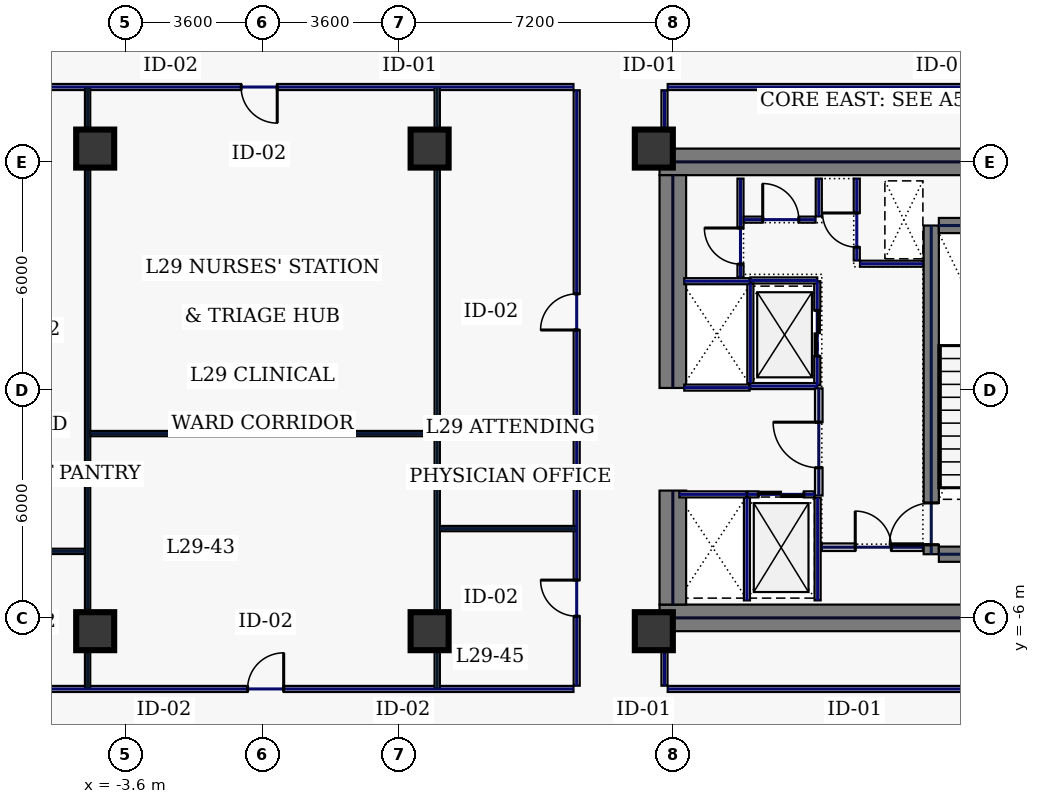
"""IFC4 building model, lengths in metres.
Left out: names, types, materials, properties, quantities, classifications, styles, units other than length and angle.
Written with IfcOpenShell. Run it as: python <this file> out.ifc"""

import sys

from ifc_helpers import new_model, si_unit, direction, frame, frame_2d, origin, origin_2d, place, context, subcontext, project, spatial, rectangle, hollow_rectangle, extrude, element, fill, save


model = new_model("IFC4")
c1 = context("Model", 3, precision=1e-05, world=origin(), true_north=direction((0.0, 1.0)))
c2 = subcontext(c1, "Body", "Model", "MODEL_VIEW")
j1 = project(units=[si_unit("LENGTHUNIT", "METRE"), si_unit("PLANEANGLEUNIT", "RADIAN")], contexts=[c1])
p1 = place(None, origin())
s1 = spatial("IfcSite", under=j1, at=p1, CompositionType="ELEMENT")
p2 = place(p1, origin())
s2 = spatial("IfcBuilding", under=s1, at=p2, CompositionType="ELEMENT")
p3 = place(p2, frame((0.0, 0.0, 129.4)))
s3 = spatial("IfcBuildingStorey", under=s2, at=p3, CompositionType="ELEMENT", Elevation=129.4)
for number, where, z_axis, x_axis in (
    (1, (10.45, 6.0, 0.0), (0.0, 0.0, 1.0), (1.0, 0.0, 0.0)),
    (2, (10.45, -6.0, 0.0), (0.0, 0.0, 1.0), (1.0, 0.0, 0.0)),
):
    element("IfcWall", number, at=place(p3, frame(where, z_axis=z_axis, x_axis=x_axis)), inside=s3, PredefinedType="SHEAR", context=c2, shape_type="SweptSolid", body=[
        extrude(rectangle(XDim=11.55, YDim=0.7, at=frame_2d((5.775, 0.0))), origin(), (0.0, 0.0, 1.0), 3.74),
    ])
p4 = place(p3, frame((10.8, -5.65, 0.0), z_axis=(0.0, 0.0, 1.0), x_axis=(0.0, 1.0, 0.0)))
e3 = element("IfcWall", 3, at=p4, inside=s3, PredefinedType="SHEAR", context=c2, shape_type="SweptSolid", body=[
    extrude(rectangle(XDim=3.0, YDim=0.7, at=frame_2d((1.5, 0.0))), origin(), (0.0, 0.0, 1.0), 3.74),
])
p5 = place(p3, frame((10.8, 0.05, 0.0), z_axis=(0.0, 0.0, 1.0), x_axis=(0.0, 1.0, 0.0)))
e4 = element("IfcWall", 4, at=p5, inside=s3, PredefinedType="SHEAR", context=c2, shape_type="SweptSolid", body=[
    extrude(rectangle(XDim=5.6, YDim=0.7, at=frame_2d((2.8, 0.0))), origin(), (0.0, 0.0, 1.0), 3.74),
])
p6 = place(p3, frame((17.6, -4.325, 0.0), z_axis=(0.0, 0.0, 1.0), x_axis=(0.0, 1.0, 0.0)))
e5 = element("IfcWall", 5, at=p6, inside=s3, PredefinedType="SHEAR", context=c2, shape_type="SweptSolid", body=[
    extrude(rectangle(XDim=8.65, YDim=0.4, at=frame_2d((4.325, 0.0))), origin(), (0.0, 0.0, 1.0), 3.74),
])
p7 = place(p6, frame((0.25, 0.0, 0.0)))
e6 = element("IfcOpeningElement", 6, at=p7, cuts=e5, PredefinedType="OPENING", context=c2, shape_type="SweptSolid", body=[
    extrude(rectangle(XDim=1.1, YDim=2.2, at=frame_2d((0.55, 1.1))), frame((0.0, 0.21, 0.0), z_axis=(0.0, -1.0, 0.0), x_axis=(1.0, 0.0, 0.0)), (0.0, 0.0, 1.0), 0.42),
])
for number, where, z_axis, x_axis in (
    (7, (17.8, -4.325, 0.0), (0.0, 0.0, 1.0), (1.0, 0.0, 0.0)),
    (8, (17.8, 4.325, 0.0), (0.0, 0.0, 1.0), (1.0, 0.0, 0.0)),
):
    element("IfcWall", number, at=place(p3, frame(where, z_axis=z_axis, x_axis=x_axis)), inside=s3, PredefinedType="SHEAR", context=c2, shape_type="SweptSolid", body=[
        extrude(rectangle(XDim=3.4, YDim=0.4, at=frame_2d((1.7, 0.0))), origin(), (0.0, 0.0, 1.0), 3.74),
    ])
for number, where, z_axis, x_axis in (
    (9, (10.3, -6.35, 0.0), (0.0, 0.0, 1.0), (1.0, 0.0, 0.0)),
    (10, (10.3, 6.35, 0.0), (0.0, 0.0, 1.0), (1.0, 0.0, 0.0)),
    (11, (-4.4, -6.35, 0.0), (0.0, 0.0, 1.0), (1.0, 0.0, 0.0)),
    (12, (4.4, -6.35, 0.0), (0.0, 0.0, 1.0), (1.0, 0.0, 0.0)),
    (13, (-4.4, 6.35, 0.0), (0.0, 0.0, 1.0), (1.0, 0.0, 0.0)),
    (14, (4.4, 6.35, 0.0), (0.0, 0.0, 1.0), (1.0, 0.0, 0.0)),
):
    element("IfcColumn", number, at=place(p3, frame(where, z_axis=z_axis, x_axis=x_axis)), inside=s3, PredefinedType="COLUMN", context=c2, shape_type="SweptSolid", body=[
        extrude(hollow_rectangle(XDim=1.0, YDim=1.0, WallThickness=0.045, at=origin_2d()), origin(), (0.0, 0.0, 1.0), 3.74),
    ])
p8 = place(p3, frame((14.6, 0.12, 0.0), z_axis=(0.0, 0.0, 1.0), x_axis=(0.0, 1.0, 0.0)))
e15 = element("IfcWall", 15, at=p8, inside=s3, PredefinedType="PARTITIONING", context=c2, shape_type="SweptSolid", body=[
    extrude(rectangle(XDim=2.74, YDim=0.16, at=frame_2d((1.37, 0.0))), origin(), (0.0, 0.0, 1.0), 3.74),
])
p9 = place(p8, frame((0.77, 0.0, 0.0)))
e16 = element("IfcOpeningElement", 16, at=p9, cuts=e15, PredefinedType="OPENING", context=c2, shape_type="SweptSolid", body=[
    extrude(rectangle(XDim=1.2, YDim=2.2, at=frame_2d((0.6, 1.1))), frame((0.0, 0.09, 0.0), z_axis=(0.0, -1.0, 0.0), x_axis=(1.0, 0.0, 0.0)), (0.0, 0.0, 1.0), 0.18),
])
for number, where, z_axis, x_axis in (
    (17, (12.84, 0.1, 0.0), (0.0, 0.0, 1.0), (1.0, 0.0, 0.0)),
    (18, (12.84, 2.88, 0.0), (0.0, 0.0, 1.0), (1.0, 0.0, 0.0)),
):
    element("IfcWall", number, at=place(p3, frame(where, z_axis=z_axis, x_axis=x_axis)), inside=s3, PredefinedType="PARTITIONING", context=c2, shape_type="SweptSolid", body=[
        extrude(rectangle(XDim=1.76, YDim=0.16, at=frame_2d((0.88, 0.0))), origin(), (0.0, 0.0, 1.0), 3.74),
    ])
p10 = place(p3, frame((12.84, 0.18, 0.0), z_axis=(0.0, 0.0, 1.0), x_axis=(0.0, 1.0, 0.0)))
e19 = element("IfcWall", 19, at=p10, inside=s3, PredefinedType="PARTITIONING", context=c2, shape_type="SweptSolid", body=[
    extrude(rectangle(XDim=2.62, YDim=0.16, at=frame_2d((1.31, 0.0))), origin(), (0.0, 0.0, 1.0), 3.74),
])
p11 = place(p3, frame((12.77, -2.75, 0.0), z_axis=(0.0, 0.0, 1.0), x_axis=(1.0, 0.0, 0.0)))
e20 = element("IfcWall", 20, at=p11, inside=s3, PredefinedType="PARTITIONING", context=c2, shape_type="SweptSolid", body=[
    extrude(rectangle(XDim=1.76, YDim=0.16, at=frame_2d((0.88, 0.0))), origin(), (0.0, 0.0, 1.0), 3.74),
])
p12 = place(p11, frame((0.28, 0.0, 0.0)))
e21 = element("IfcOpeningElement", 21, at=p12, cuts=e20, PredefinedType="OPENING", context=c2, shape_type="SweptSolid", body=[
    extrude(rectangle(XDim=1.2, YDim=2.2, at=frame_2d((0.6, 1.1))), frame((0.0, 0.09, 0.0), z_axis=(0.0, -1.0, 0.0), x_axis=(1.0, 0.0, 0.0)), (0.0, 0.0, 1.0), 0.18),
])
for number, where, z_axis, x_axis in (
    (22, (12.75, -5.54, 0.0), (0.0, 0.0, 1.0), (0.0, 1.0, 0.0)),
    (23, (14.61, -5.54, 0.0), (0.0, 0.0, 1.0), (0.0, 1.0, 0.0)),
):
    element("IfcWall", number, at=place(p3, frame(where, z_axis=z_axis, x_axis=x_axis)), inside=s3, PredefinedType="PARTITIONING", context=c2, shape_type="SweptSolid", body=[
        extrude(rectangle(XDim=2.7, YDim=0.16, at=frame_2d((1.35, 0.0))), origin(), (0.0, 0.0, 1.0), 3.74),
    ])
p13 = place(p3, frame((10.97, -2.75, 0.0), z_axis=(0.0, 0.0, 1.0), x_axis=(1.0, 0.0, 0.0)))
e24 = element("IfcWall", 24, at=p13, inside=s3, PredefinedType="PARTITIONING", context=c2, shape_type="SweptSolid", body=[
    extrude(rectangle(XDim=1.76, YDim=0.16, at=frame_2d((0.88, 0.0))), origin(), (0.0, 0.0, 1.0), 3.74),
])
for number, where, z_axis, x_axis in (
    (25, (11.1, 0.06, 0.0), (0.0, 0.0, 1.0), (1.0, 0.0, 0.0)),
    (26, (11.1, 2.86, 0.0), (0.0, 0.0, 1.0), (1.0, 0.0, 0.0)),
):
    element("IfcWall", number, at=place(p3, frame(where, z_axis=z_axis, x_axis=x_axis)), inside=s3, PredefinedType="PARTITIONING", context=c2, shape_type="SweptSolid", body=[
        extrude(rectangle(XDim=1.72, YDim=0.16, at=frame_2d((0.86, 0.0))), origin(), (0.0, 0.0, 1.0), 3.74),
    ])
p14 = place(p3, frame((15.64, 3.405, 0.0), z_axis=(0.0, 0.0, 1.0), x_axis=(0.0, 1.0, 0.0)))
e27 = element("IfcWall", 27, at=p14, inside=s3, PredefinedType="PARTITIONING", context=c2, shape_type="SweptSolid", body=[
    extrude(rectangle(XDim=2.155, YDim=0.16, at=frame_2d((1.078, 0.0))), origin(), (0.0, 0.0, 1.0), 3.74),
])
p15 = place(p14, frame((0.35, 0.0, 0.0)))
e28 = element("IfcOpeningElement", 28, at=p15, cuts=e27, PredefinedType="OPENING", context=c2, shape_type="SweptSolid", body=[
    extrude(rectangle(XDim=0.9, YDim=2.2, at=frame_2d((0.45, 1.1))), frame((0.0, 0.09, 0.0), z_axis=(0.0, -1.0, 0.0), x_axis=(1.0, 0.0, 0.0)), (0.0, 0.0, 1.0), 0.18),
])
p16 = place(p3, frame((15.725, 3.32, 0.0), z_axis=(0.0, 0.0, 1.0), x_axis=(1.0, 0.0, 0.0)))
e29 = element("IfcWall", 29, at=p16, inside=s3, PredefinedType="PARTITIONING", context=c2, shape_type="SweptSolid", body=[
    extrude(rectangle(XDim=1.655, YDim=0.16, at=frame_2d((0.827, 0.0))), origin(), (0.0, 0.0, 1.0), 3.74),
])
p17 = place(p3, frame((14.72, -4.14, 0.0), z_axis=(0.0, 0.0, 1.0), x_axis=(1.0, 0.0, 0.0)))
e30 = element("IfcWall", 30, at=p17, inside=s3, PredefinedType="SOLIDWALL", context=c2, shape_type="SweptSolid", body=[
    extrude(rectangle(XDim=2.66, YDim=0.2, at=frame_2d((1.33, 0.0))), origin(), (0.0, 0.0, 1.0), 3.74),
])
p18 = place(p17, frame((0.88, 0.0, 0.0)))
e31 = element("IfcOpeningElement", 31, at=p18, cuts=e30, PredefinedType="OPENING", context=c2, shape_type="SweptSolid", body=[
    extrude(rectangle(XDim=0.95, YDim=2.2, at=frame_2d((0.475, 1.1))), frame((0.0, 0.11, 0.0), z_axis=(0.0, -1.0, 0.0), x_axis=(1.0, 0.0, 0.0)), (0.0, 0.0, 1.0), 0.22),
])
p19 = place(p3, frame((12.58, 2.96, 0.0), z_axis=(0.0, 0.0, 1.0), x_axis=(0.0, 1.0, 0.0)))
e32 = element("IfcWall", 32, at=p19, inside=s3, PredefinedType="PARTITIONING", context=c2, shape_type="SweptSolid", body=[
    extrude(rectangle(XDim=2.6, YDim=0.16, at=frame_2d((1.3, 0.0))), origin(), (0.0, 0.0, 1.0), 3.74),
])
p20 = place(p19, frame((0.35, 0.0, 0.0)))
e33 = element("IfcOpeningElement", 33, at=p20, cuts=e32, PredefinedType="OPENING", context=c2, shape_type="SweptSolid", body=[
    extrude(rectangle(XDim=0.95, YDim=2.2, at=frame_2d((0.475, 1.1))), frame((0.0, 0.09, 0.0), z_axis=(0.0, -1.0, 0.0), x_axis=(1.0, 0.0, 0.0)), (0.0, 0.0, 1.0), 0.18),
])
p21 = place(p3, frame((12.665, 4.48, 0.0), z_axis=(0.0, 0.0, 1.0), x_axis=(1.0, 0.0, 0.0)))
e34 = element("IfcWall", 34, at=p21, inside=s3, PredefinedType="PARTITIONING", context=c2, shape_type="SweptSolid", body=[
    extrude(rectangle(XDim=1.89, YDim=0.16, at=frame_2d((0.945, 0.0))), origin(), (0.0, 0.0, 1.0), 3.74),
])
p22 = place(p21, frame((0.5, 0.0, 0.0)))
e35 = element("IfcOpeningElement", 35, at=p22, cuts=e34, PredefinedType="OPENING", context=c2, shape_type="SweptSolid", body=[
    extrude(rectangle(XDim=0.95, YDim=2.2, at=frame_2d((0.475, 1.1))), frame((0.0, 0.09, 0.0), z_axis=(0.0, -1.0, 0.0), x_axis=(1.0, 0.0, 0.0)), (0.0, 0.0, 1.0), 0.18),
])
p23 = place(p3, frame((14.64, 4.565, 0.0), z_axis=(0.0, 0.0, 1.0), x_axis=(0.0, 1.0, 0.0)))
e36 = element("IfcWall", 36, at=p23, inside=s3, PredefinedType="PARTITIONING", context=c2, shape_type="SweptSolid", body=[
    extrude(rectangle(XDim=0.995, YDim=0.16, at=frame_2d((0.498, 0.0))), origin(), (0.0, 0.0, 1.0), 3.74),
])
p24 = place(p3, frame((14.64, -2.78, 0.0), z_axis=(0.0, 0.0, 1.0), x_axis=(0.0, 1.0, 0.0)))
e37 = element("IfcWall", 37, at=p24, inside=s3, PredefinedType="SOLIDWALL", context=c2, shape_type="SweptSolid", body=[
    extrude(rectangle(XDim=2.82, YDim=0.2, at=frame_2d((1.41, 0.0))), origin(), (0.0, 0.0, 1.0), 3.74),
])
p25 = place(p24, frame((0.73, 0.0, 0.0)))
e38 = element("IfcOpeningElement", 38, at=p25, cuts=e37, PredefinedType="OPENING", context=c2, shape_type="SweptSolid", body=[
    extrude(rectangle(XDim=1.2, YDim=2.2, at=frame_2d((0.6, 1.1))), frame((0.0, 0.11, 0.0), z_axis=(0.0, -1.0, 0.0), x_axis=(1.0, 0.0, 0.0)), (0.0, 0.0, 1.0), 0.22),
])
p26 = place(p3, frame((25.235, 7.97, 0.0), z_axis=(0.0, 0.0, 1.0), x_axis=(-1.0, 0.0, 0.0)))
e39 = element("IfcWall", 39, at=p26, inside=s3, PredefinedType="PARTITIONING", context=c2, shape_type="SweptSolid", body=[
    extrude(rectangle(XDim=14.57, YDim=0.16, at=frame_2d((7.285, 0.0))), origin(), (0.0, 0.0, 1.0), 3.74),
])
p27 = place(p3, frame((10.58, 7.885, 0.0), z_axis=(0.0, 0.0, 1.0), x_axis=(0.0, -1.0, 0.0)))
e40 = element("IfcWall", 40, at=p27, inside=s3, PredefinedType="PARTITIONING", context=c2, shape_type="SweptSolid", body=[
    extrude(rectangle(XDim=1.465, YDim=0.16, at=frame_2d((0.732, 0.0))), origin(), (0.0, 0.0, 1.0), 3.74),
])
p28 = place(p3, frame((10.58, -6.42, 0.0), z_axis=(0.0, 0.0, 1.0), x_axis=(0.0, -1.0, 0.0)))
e41 = element("IfcWall", 41, at=p28, inside=s3, PredefinedType="PARTITIONING", context=c2, shape_type="SweptSolid", body=[
    extrude(rectangle(XDim=1.365, YDim=0.16, at=frame_2d((0.683, 0.0))), origin(), (0.0, 0.0, 1.0), 3.74),
])
p29 = place(p3, frame((10.665, -7.87, 0.0), z_axis=(0.0, 0.0, 1.0), x_axis=(1.0, 0.0, 0.0)))
e42 = element("IfcWall", 42, at=p29, inside=s3, PredefinedType="PARTITIONING", context=c2, shape_type="SweptSolid", body=[
    extrude(rectangle(XDim=14.57, YDim=0.16, at=frame_2d((7.285, 0.0))), origin(), (0.0, 0.0, 1.0), 3.74),
])
p30 = place(p3, frame((8.27, -7.785, 0.0), z_axis=(0.0, 0.0, 1.0), x_axis=(0.0, 1.0, 0.0)))
e43 = element("IfcWall", 43, at=p30, inside=s3, PredefinedType="PARTITIONING", context=c2, shape_type="SweptSolid", body=[
    extrude(rectangle(XDim=15.67, YDim=0.16, at=frame_2d((7.835, 0.0))), origin(), (0.0, 0.0, 1.0), 3.74),
])
p31 = place(p30, frame((1.829, 0.0, 0.0)))
e44 = element("IfcOpeningElement", 44, at=p31, cuts=e43, PredefinedType="OPENING", context=c2, shape_type="SweptSolid", body=[
    extrude(rectangle(XDim=0.95, YDim=2.2, at=frame_2d((0.475, 1.1))), frame((0.0, 0.09, 0.0), z_axis=(0.0, -1.0, 0.0), x_axis=(1.0, 0.0, 0.0)), (0.0, 0.0, 1.0), 0.18),
])
p32 = place(p30, frame((9.361, 0.0, 0.0)))
e45 = element("IfcOpeningElement", 45, at=p32, cuts=e43, PredefinedType="OPENING", context=c2, shape_type="SweptSolid", body=[
    extrude(rectangle(XDim=0.95, YDim=2.2, at=frame_2d((0.475, 1.1))), frame((0.0, 0.09, 0.0), z_axis=(0.0, -1.0, 0.0), x_axis=(1.0, 0.0, 0.0)), (0.0, 0.0, 1.0), 0.18),
])
p33 = place(p3, frame((8.185, 7.97, 0.0), z_axis=(0.0, 0.0, 1.0), x_axis=(-1.0, 0.0, 0.0)))
e46 = element("IfcWall", 46, at=p33, inside=s3, PredefinedType="PARTITIONING", context=c2, shape_type="SweptSolid", body=[
    extrude(rectangle(XDim=16.37, YDim=0.16, at=frame_2d((8.185, 0.0))), origin(), (0.0, 0.0, 1.0), 3.74),
])
p34 = place(p33, frame((7.795, 0.0, 0.0)))
e47 = element("IfcOpeningElement", 47, at=p34, cuts=e46, PredefinedType="OPENING", context=c2, shape_type="SweptSolid", body=[
    extrude(rectangle(XDim=0.95, YDim=2.2, at=frame_2d((0.475, 1.1))), frame((0.0, 0.09, 0.0), z_axis=(0.0, -1.0, 0.0), x_axis=(1.0, 0.0, 0.0)), (0.0, 0.0, 1.0), 0.18),
])
p35 = place(p3, frame((-8.185, -7.87, 0.0), z_axis=(0.0, 0.0, 1.0), x_axis=(1.0, 0.0, 0.0)))
e48 = element("IfcWall", 48, at=p35, inside=s3, PredefinedType="PARTITIONING", context=c2, shape_type="SweptSolid", body=[
    extrude(rectangle(XDim=16.37, YDim=0.16, at=frame_2d((8.185, 0.0))), origin(), (0.0, 0.0, 1.0), 3.74),
])
p36 = place(p35, frame((1.554, 0.0, 0.0)))
e49 = element("IfcOpeningElement", 49, at=p36, cuts=e48, PredefinedType="OPENING", context=c2, shape_type="SweptSolid", body=[
    extrude(rectangle(XDim=0.95, YDim=2.2, at=frame_2d((0.475, 1.1))), frame((0.0, 0.09, 0.0), z_axis=(0.0, -1.0, 0.0), x_axis=(1.0, 0.0, 0.0)), (0.0, 0.0, 1.0), 0.18),
])
p37 = place(p35, frame((7.795, 0.0, 0.0)))
e50 = element("IfcOpeningElement", 50, at=p37, cuts=e48, PredefinedType="OPENING", context=c2, shape_type="SweptSolid", body=[
    extrude(rectangle(XDim=0.95, YDim=2.2, at=frame_2d((0.475, 1.1))), frame((0.0, 0.09, 0.0), z_axis=(0.0, -1.0, 0.0), x_axis=(1.0, 0.0, 0.0)), (0.0, 0.0, 1.0), 0.18),
])
for number, where, z_axis, x_axis in (
    (51, (-4.6, -7.865, 0.0), (0.0, 0.0, 1.0), (0.0, 1.0, 0.0)),
    (52, (4.6, -7.865, 0.0), (0.0, 0.0, 1.0), (0.0, 1.0, 0.0)),
):
    element("IfcWall", number, at=place(p3, frame(where, z_axis=z_axis, x_axis=x_axis)), inside=s3, PredefinedType="PARTITIONING", context=c2, shape_type="SweptSolid", body=[
        extrude(rectangle(XDim=15.83, YDim=0.14, at=frame_2d((7.915, 0.0))), origin(), (0.0, 0.0, 1.0), 2.935),
    ])
p38 = place(p3, frame((-4.525, -1.15, 0.0), z_axis=(0.0, 0.0, 1.0), x_axis=(1.0, 0.0, 0.0)))
e53 = element("IfcWall", 53, at=p38, inside=s3, PredefinedType="PARTITIONING", context=c2, shape_type="SweptSolid", body=[
    extrude(rectangle(XDim=9.05, YDim=0.14, at=frame_2d((4.525, 0.0))), origin(), (0.0, 0.0, 1.0), 3.74),
])
for number, where, z_axis, x_axis in (
    (54, (-8.265, -4.25, 0.0), (0.0, 0.0, 1.0), (1.0, 0.0, 0.0)),
    (55, (4.675, -3.65, 0.0), (0.0, 0.0, 1.0), (1.0, 0.0, 0.0)),
):
    element("IfcWall", number, at=place(p3, frame(where, z_axis=z_axis, x_axis=x_axis)), inside=s3, PredefinedType="PARTITIONING", context=c2, shape_type="SweptSolid", body=[
        extrude(rectangle(XDim=3.59, YDim=0.14, at=frame_2d((1.795, 0.0))), origin(), (0.0, 0.0, 1.0), 3.74),
    ])
p39 = place(p7, origin())
e56 = element("IfcDoor", 56, at=p39, inside=s3, OperationType="SINGLE_SWING_LEFT", PredefinedType="DOOR", context=c2, shape_type="SweptSolid", body=[
    extrude(rectangle(XDim=1.1, YDim=2.2, at=frame_2d((0.55, 1.1))), frame((0.0, 0.025, 0.0), z_axis=(0.0, -1.0, 0.0), x_axis=(1.0, 0.0, 0.0)), (0.0, 0.0, 1.0), 0.05),
])
fill(e6, e56)
p40 = place(p9, origin())
e57 = element("IfcDoor", 57, at=p40, inside=s3, OperationType="SLIDING_TO_LEFT", PredefinedType="DOOR", context=c2, shape_type="SweptSolid", body=[
    extrude(rectangle(XDim=1.2, YDim=2.2, at=frame_2d((0.6, 1.1))), frame((0.0, 0.025, 0.0), z_axis=(0.0, -1.0, 0.0), x_axis=(1.0, 0.0, 0.0)), (0.0, 0.0, 1.0), 0.05),
])
fill(e16, e57)
p41 = place(p12, origin())
e58 = element("IfcDoor", 58, at=p41, inside=s3, OperationType="SLIDING_TO_LEFT", PredefinedType="DOOR", context=c2, shape_type="SweptSolid", body=[
    extrude(rectangle(XDim=1.2, YDim=2.2, at=frame_2d((0.6, 1.1))), frame((0.0, 0.025, 0.0), z_axis=(0.0, -1.0, 0.0), x_axis=(1.0, 0.0, 0.0)), (0.0, 0.0, 1.0), 0.05),
])
fill(e21, e58)
p42 = place(p15, origin())
e59 = element("IfcDoor", 59, at=p42, inside=s3, OperationType="SINGLE_SWING_RIGHT", PredefinedType="DOOR", context=c2, shape_type="SweptSolid", body=[
    extrude(rectangle(XDim=0.9, YDim=2.2, at=frame_2d((0.45, 1.1))), frame((0.0, 0.025, 0.0), z_axis=(0.0, -1.0, 0.0), x_axis=(1.0, 0.0, 0.0)), (0.0, 0.0, 1.0), 0.05),
])
fill(e28, e59)
p43 = place(p18, origin())
e60 = element("IfcDoor", 60, at=p43, inside=s3, OperationType="SINGLE_SWING_LEFT", PredefinedType="DOOR", context=c2, shape_type="SweptSolid", body=[
    extrude(rectangle(XDim=0.95, YDim=2.2, at=frame_2d((0.475, 1.1))), frame((0.0, 0.025, 0.0), z_axis=(0.0, -1.0, 0.0), x_axis=(1.0, 0.0, 0.0)), (0.0, 0.0, 1.0), 0.05),
])
fill(e31, e60)
p44 = place(p20, origin())
e61 = element("IfcDoor", 61, at=p44, inside=s3, OperationType="SINGLE_SWING_RIGHT", PredefinedType="DOOR", context=c2, shape_type="SweptSolid", body=[
    extrude(rectangle(XDim=0.95, YDim=2.2, at=frame_2d((0.475, 1.1))), frame((0.0, 0.025, 0.0), z_axis=(0.0, -1.0, 0.0), x_axis=(1.0, 0.0, 0.0)), (0.0, 0.0, 1.0), 0.05),
])
fill(e33, e61)
p45 = place(p22, origin())
e62 = element("IfcDoor", 62, at=p45, inside=s3, OperationType="SINGLE_SWING_LEFT", PredefinedType="DOOR", context=c2, shape_type="SweptSolid", body=[
    extrude(rectangle(XDim=0.95, YDim=2.2, at=frame_2d((0.475, 1.1))), frame((0.0, 0.025, 0.0), z_axis=(0.0, -1.0, 0.0), x_axis=(1.0, 0.0, 0.0)), (0.0, 0.0, 1.0), 0.05),
])
fill(e35, e62)
p46 = place(p25, origin())
e63 = element("IfcDoor", 63, at=p46, inside=s3, OperationType="SINGLE_SWING_RIGHT", PredefinedType="DOOR", context=c2, shape_type="SweptSolid", body=[
    extrude(rectangle(XDim=1.2, YDim=2.2, at=frame_2d((0.6, 1.1))), frame((0.0, 0.025, 0.0), z_axis=(0.0, -1.0, 0.0), x_axis=(1.0, 0.0, 0.0)), (0.0, 0.0, 1.0), 0.05),
])
fill(e38, e63)
p47 = place(p37, origin())
e64 = element("IfcDoor", 64, at=p47, inside=s3, OperationType="SINGLE_SWING_RIGHT", PredefinedType="DOOR", context=c2, shape_type="SweptSolid", body=[
    extrude(rectangle(XDim=0.95, YDim=2.2, at=frame_2d((0.475, 1.1))), frame((0.0, 0.025, 0.0), z_axis=(0.0, -1.0, 0.0), x_axis=(1.0, 0.0, 0.0)), (0.0, 0.0, 1.0), 0.05),
])
fill(e50, e64)
p48 = place(p34, origin())
e65 = element("IfcDoor", 65, at=p48, inside=s3, OperationType="SINGLE_SWING_LEFT", PredefinedType="DOOR", context=c2, shape_type="SweptSolid", body=[
    extrude(rectangle(XDim=0.95, YDim=2.2, at=frame_2d((0.475, 1.1))), frame((0.0, 0.025, 0.0), z_axis=(0.0, -1.0, 0.0), x_axis=(1.0, 0.0, 0.0)), (0.0, 0.0, 1.0), 0.05),
])
fill(e47, e65)
p49 = place(p31, origin())
e66 = element("IfcDoor", 66, at=p49, inside=s3, OperationType="SINGLE_SWING_RIGHT", PredefinedType="DOOR", context=c2, shape_type="SweptSolid", body=[
    extrude(rectangle(XDim=0.95, YDim=2.2, at=frame_2d((0.475, 1.1))), frame((0.0, 0.025, 0.0), z_axis=(0.0, -1.0, 0.0), x_axis=(1.0, 0.0, 0.0)), (0.0, 0.0, 1.0), 0.05),
])
fill(e44, e66)
p50 = place(p32, origin())
e67 = element("IfcDoor", 67, at=p50, inside=s3, OperationType="SINGLE_SWING_LEFT", PredefinedType="DOOR", context=c2, shape_type="SweptSolid", body=[
    extrude(rectangle(XDim=0.95, YDim=2.2, at=frame_2d((0.475, 1.1))), frame((0.0, 0.025, 0.0), z_axis=(0.0, -1.0, 0.0), x_axis=(1.0, 0.0, 0.0)), (0.0, 0.0, 1.0), 0.05),
])
fill(e45, e67)
save(model, sys.argv[1])
